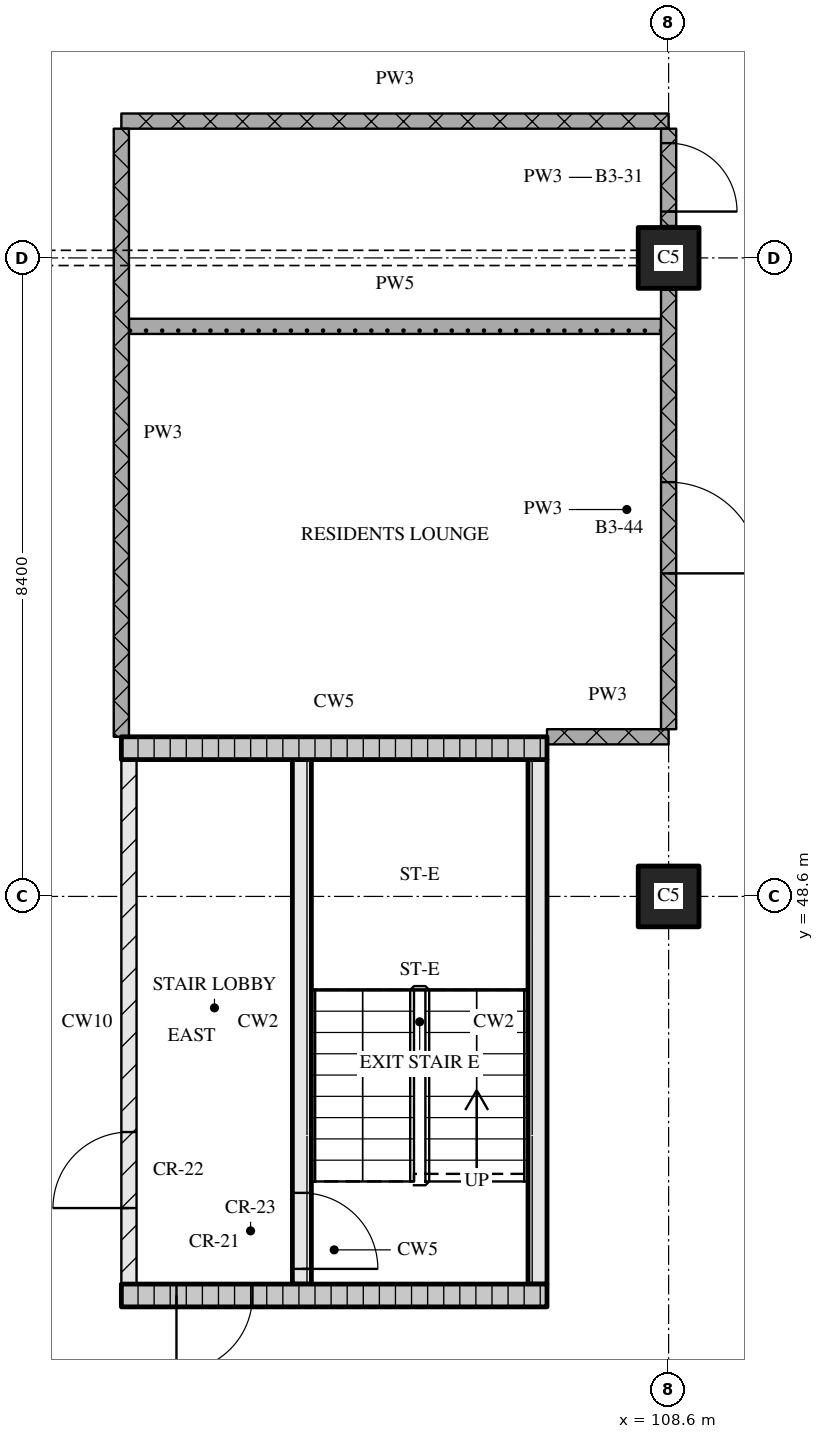
"""IFC4 building model, lengths in metres.
Left out: names, types, materials, properties, quantities, classifications, styles, units other than length and angle.
Written with IfcOpenShell. Run it as: python <this file> out.ifc"""

import sys

from ifc_helpers import new_model, si_unit, direction, frame, frame_2d, origin, origin_2d, place, context, subcontext, project, spatial, rectangle, extrude, element, fill, save


model = new_model("IFC4")
c1 = context("Model", 3, precision=1e-05, world=origin(), true_north=direction((0.0, 1.0)))
c2 = subcontext(c1, "Body", "Model", "MODEL_VIEW")
j1 = project(units=[si_unit("LENGTHUNIT", "METRE"), si_unit("PLANEANGLEUNIT", "RADIAN")], contexts=[c1])
p1 = place(None, origin())
s1 = spatial("IfcSite", under=j1, at=p1, CompositionType="ELEMENT")
p2 = place(p1, origin())
s2 = spatial("IfcBuilding", under=s1, at=p2, CompositionType="ELEMENT")
p3 = place(p2, frame((0.0, 0.0, 120.45)))
s3 = spatial("IfcBuildingStorey", under=s2, at=p3, CompositionType="ELEMENT", Elevation=120.45)
for number, where, z_axis, x_axis in (
    (1, (108.6, 48.6, 0.0), (0.0, 0.0, 1.0), (1.0, 0.0, 0.0)),
    (2, (108.6, 57.0, 0.0), (0.0, 0.0, 1.0), (1.0, 0.0, 0.0)),
):
    element("IfcColumn", number, at=place(p3, frame(where, z_axis=z_axis, x_axis=x_axis)), inside=s3, PredefinedType="COLUMN", context=c2, shape_type="SweptSolid", body=[
        extrude(rectangle(XDim=0.8, YDim=0.8, at=origin_2d()), origin(), (0.0, 0.0, 1.0), 3.6),
    ])
p4 = place(p3, frame((101.4, 43.35, 0.0), z_axis=(0.0, 0.0, 1.0), x_axis=(1.0, 0.0, 0.0)))
e3 = element("IfcWall", 3, at=p4, inside=s3, PredefinedType="SOLIDWALL", context=c2, shape_type="SweptSolid", body=[
    extrude(rectangle(XDim=5.6, YDim=0.3, at=frame_2d((2.8, 0.0))), origin(), (0.0, 0.0, 1.0), 3.32),
])
p5 = place(p4, frame((0.725, 0.0, 0.0)))
e4 = element("IfcOpeningElement", 4, at=p5, cuts=e3, PredefinedType="OPENING", context=c2, shape_type="SweptSolid", body=[
    extrude(rectangle(XDim=1.0, YDim=2.1, at=frame_2d((0.5, 1.05))), frame((0.0, 0.16, 0.0), z_axis=(0.0, -1.0, 0.0), x_axis=(1.0, 0.0, 0.0)), (0.0, 0.0, 1.0), 0.32),
])
p6 = place(p3, frame((101.5, 43.5, 0.0), z_axis=(0.0, 0.0, 1.0), x_axis=(0.0, 1.0, 0.0)))
e5 = element("IfcWall", 5, at=p6, inside=s3, PredefinedType="PARTITIONING", context=c2, shape_type="SweptSolid", body=[
    extrude(rectangle(XDim=6.9, YDim=0.2, at=frame_2d((3.45, 0.0))), origin(), (0.0, 0.0, 1.0), 3.32),
])
p7 = place(p6, frame((1.0, 0.0, 0.0)))
e6 = element("IfcOpeningElement", 6, at=p7, cuts=e5, PredefinedType="OPENING", context=c2, shape_type="SweptSolid", body=[
    extrude(rectangle(XDim=1.0, YDim=2.1, at=frame_2d((0.5, 1.05))), frame((0.0, 0.11, 0.0), z_axis=(0.0, -1.0, 0.0), x_axis=(1.0, 0.0, 0.0)), (0.0, 0.0, 1.0), 0.22),
])
p8 = place(p3, frame((103.775, 43.5, 0.0), z_axis=(0.0, 0.0, 1.0), x_axis=(0.0, 1.0, 0.0)))
e7 = element("IfcWall", 7, at=p8, inside=s3, PredefinedType="SOLIDWALL", context=c2, shape_type="SweptSolid", body=[
    extrude(rectangle(XDim=6.9, YDim=0.25, at=frame_2d((3.45, 0.0))), origin(), (0.0, 0.0, 1.0), 3.32),
])
p9 = place(p8, frame((0.2, 0.0, 0.0)))
e8 = element("IfcOpeningElement", 8, at=p9, cuts=e7, PredefinedType="OPENING", context=c2, shape_type="SweptSolid", body=[
    extrude(rectangle(XDim=1.0, YDim=2.1, at=frame_2d((0.5, 1.05))), frame((0.0, 0.135, 0.0), z_axis=(0.0, -1.0, 0.0), x_axis=(1.0, 0.0, 0.0)), (0.0, 0.0, 1.0), 0.27),
])
p10 = place(p3, frame((106.875, 43.5, 0.0), z_axis=(0.0, 0.0, 1.0), x_axis=(0.0, 1.0, 0.0)))
e9 = element("IfcWall", 9, at=p10, inside=s3, PredefinedType="SOLIDWALL", context=c2, shape_type="SweptSolid", body=[
    extrude(rectangle(XDim=6.9, YDim=0.25, at=frame_2d((3.45, 0.0))), origin(), (0.0, 0.0, 1.0), 3.32),
])
p11 = place(p3, frame((101.4, 50.55, 0.0), z_axis=(0.0, 0.0, 1.0), x_axis=(1.0, 0.0, 0.0)))
e10 = element("IfcWall", 10, at=p11, inside=s3, PredefinedType="SOLIDWALL", context=c2, shape_type="SweptSolid", body=[
    extrude(rectangle(XDim=5.6, YDim=0.3, at=frame_2d((2.8, 0.0))), origin(), (0.0, 0.0, 1.0), 3.32),
])
p12 = place(p3, frame((107.0, 50.7, 0.0), z_axis=(0.0, 0.0, 1.0), x_axis=(1.0, 0.0, 0.0)))
e11 = element("IfcWall", 11, at=p12, inside=s3, PredefinedType="PARTITIONING", context=c2, shape_type="SweptSolid", body=[
    extrude(rectangle(XDim=1.6, YDim=0.2, at=frame_2d((0.8, 0.0))), origin(), (0.0, 0.0, 1.0), 3.32),
])
p13 = place(p3, frame((101.5, 56.1, 0.0), z_axis=(0.0, 0.0, 1.0), x_axis=(1.0, 0.0, 0.0)))
e12 = element("IfcWall", 12, at=p13, inside=s3, PredefinedType="PARTITIONING", context=c2, shape_type="SweptSolid", body=[
    extrude(rectangle(XDim=7.0, YDim=0.2, at=frame_2d((3.5, 0.0))), origin(), (0.0, 0.0, 1.0), 3.32),
])
p14 = place(p3, frame((101.4, 58.8, 0.0), z_axis=(0.0, 0.0, 1.0), x_axis=(1.0, 0.0, 0.0)))
e13 = element("IfcWall", 13, at=p14, inside=s3, PredefinedType="PARTITIONING", context=c2, shape_type="SweptSolid", body=[
    extrude(rectangle(XDim=7.2, YDim=0.2, at=frame_2d((3.6, 0.0))), origin(), (0.0, 0.0, 1.0), 3.32),
])
p15 = place(p3, frame((101.4, 58.7, 0.0), z_axis=(0.0, 0.0, 1.0), x_axis=(0.0, -1.0, 0.0)))
e14 = element("IfcWall", 14, at=p15, inside=s3, PredefinedType="PARTITIONING", context=c2, shape_type="SweptSolid", body=[
    extrude(rectangle(XDim=8.0, YDim=0.2, at=frame_2d((4.0, 0.0))), origin(), (0.0, 0.0, 1.0), 3.32),
])
p16 = place(p3, frame((108.6, 50.8, 0.0), z_axis=(0.0, 0.0, 1.0), x_axis=(0.0, 1.0, 0.0)))
e15 = element("IfcWall", 15, at=p16, inside=s3, PredefinedType="PARTITIONING", context=c2, shape_type="SweptSolid", body=[
    extrude(rectangle(XDim=5.78, YDim=0.2, at=frame_2d((2.89, 0.0))), origin(), (0.0, 0.0, 1.0), 3.32),
])
p17 = place(p16, frame((2.05, 0.0, 0.0)))
e16 = element("IfcOpeningElement", 16, at=p17, cuts=e15, PredefinedType="OPENING", context=c2, shape_type="SweptSolid", body=[
    extrude(rectangle(XDim=1.2, YDim=2.1, at=frame_2d((0.6, 1.05))), frame((0.0, 0.11, 0.0), z_axis=(0.0, -1.0, 0.0), x_axis=(1.0, 0.0, 0.0)), (0.0, 0.0, 1.0), 0.22),
])
p18 = place(p3, frame((108.6, 57.42, 0.0), z_axis=(0.0, 0.0, 1.0), x_axis=(0.0, 1.0, 0.0)))
e17 = element("IfcWall", 17, at=p18, inside=s3, PredefinedType="PARTITIONING", context=c2, shape_type="SweptSolid", body=[
    extrude(rectangle(XDim=1.28, YDim=0.2, at=frame_2d((0.64, 0.0))), origin(), (0.0, 0.0, 1.0), 3.32),
])
p19 = place(p18, frame((0.19, 0.0, 0.0)))
e18 = element("IfcOpeningElement", 18, at=p19, cuts=e17, PredefinedType="OPENING", context=c2, shape_type="SweptSolid", body=[
    extrude(rectangle(XDim=0.9, YDim=2.1, at=frame_2d((0.45, 1.05))), frame((0.0, 0.11, 0.0), z_axis=(0.0, -1.0, 0.0), x_axis=(1.0, 0.0, 0.0)), (0.0, 0.0, 1.0), 0.22),
])
p20 = place(p5, origin())
e19 = element("IfcDoor", 19, at=p20, inside=s3, OperationType="SINGLE_SWING_RIGHT", PredefinedType="DOOR", context=c2, shape_type="SweptSolid", body=[
    extrude(rectangle(XDim=1.0, YDim=2.1, at=frame_2d((0.5, 1.05))), frame((0.0, 0.025, 0.0), z_axis=(0.0, -1.0, 0.0), x_axis=(1.0, 0.0, 0.0)), (0.0, 0.0, 1.0), 0.05),
])
fill(e4, e19)
p21 = place(p9, origin())
e20 = element("IfcDoor", 20, at=p21, inside=s3, OperationType="SINGLE_SWING_RIGHT", PredefinedType="DOOR", context=c2, shape_type="SweptSolid", body=[
    extrude(rectangle(XDim=1.0, YDim=2.1, at=frame_2d((0.5, 1.05))), frame((0.0, 0.025, 0.0), z_axis=(0.0, -1.0, 0.0), x_axis=(1.0, 0.0, 0.0)), (0.0, 0.0, 1.0), 0.05),
])
fill(e8, e20)
p22 = place(p7, origin())
e21 = element("IfcDoor", 21, at=p22, inside=s3, OperationType="SINGLE_SWING_LEFT", PredefinedType="DOOR", context=c2, shape_type="SweptSolid", body=[
    extrude(rectangle(XDim=1.0, YDim=2.1, at=frame_2d((0.5, 1.05))), frame((0.0, 0.025, 0.0), z_axis=(0.0, -1.0, 0.0), x_axis=(1.0, 0.0, 0.0)), (0.0, 0.0, 1.0), 0.05),
])
fill(e6, e21)
p23 = place(p17, origin())
e22 = element("IfcDoor", 22, at=p23, inside=s3, OperationType="SINGLE_SWING_RIGHT", PredefinedType="DOOR", context=c2, shape_type="SweptSolid", body=[
    extrude(rectangle(XDim=1.2, YDim=2.1, at=frame_2d((0.6, 1.05))), frame((0.0, 0.025, 0.0), z_axis=(0.0, -1.0, 0.0), x_axis=(1.0, 0.0, 0.0)), (0.0, 0.0, 1.0), 0.05),
])
fill(e16, e22)
p24 = place(p19, origin())
e23 = element("IfcDoor", 23, at=p24, inside=s3, OperationType="SINGLE_SWING_RIGHT", PredefinedType="DOOR", context=c2, shape_type="SweptSolid", body=[
    extrude(rectangle(XDim=0.9, YDim=2.1, at=frame_2d((0.45, 1.05))), frame((0.0, 0.025, 0.0), z_axis=(0.0, -1.0, 0.0), x_axis=(1.0, 0.0, 0.0)), (0.0, 0.0, 1.0), 0.05),
])
fill(e18, e23)
save(model, sys.argv[1])
